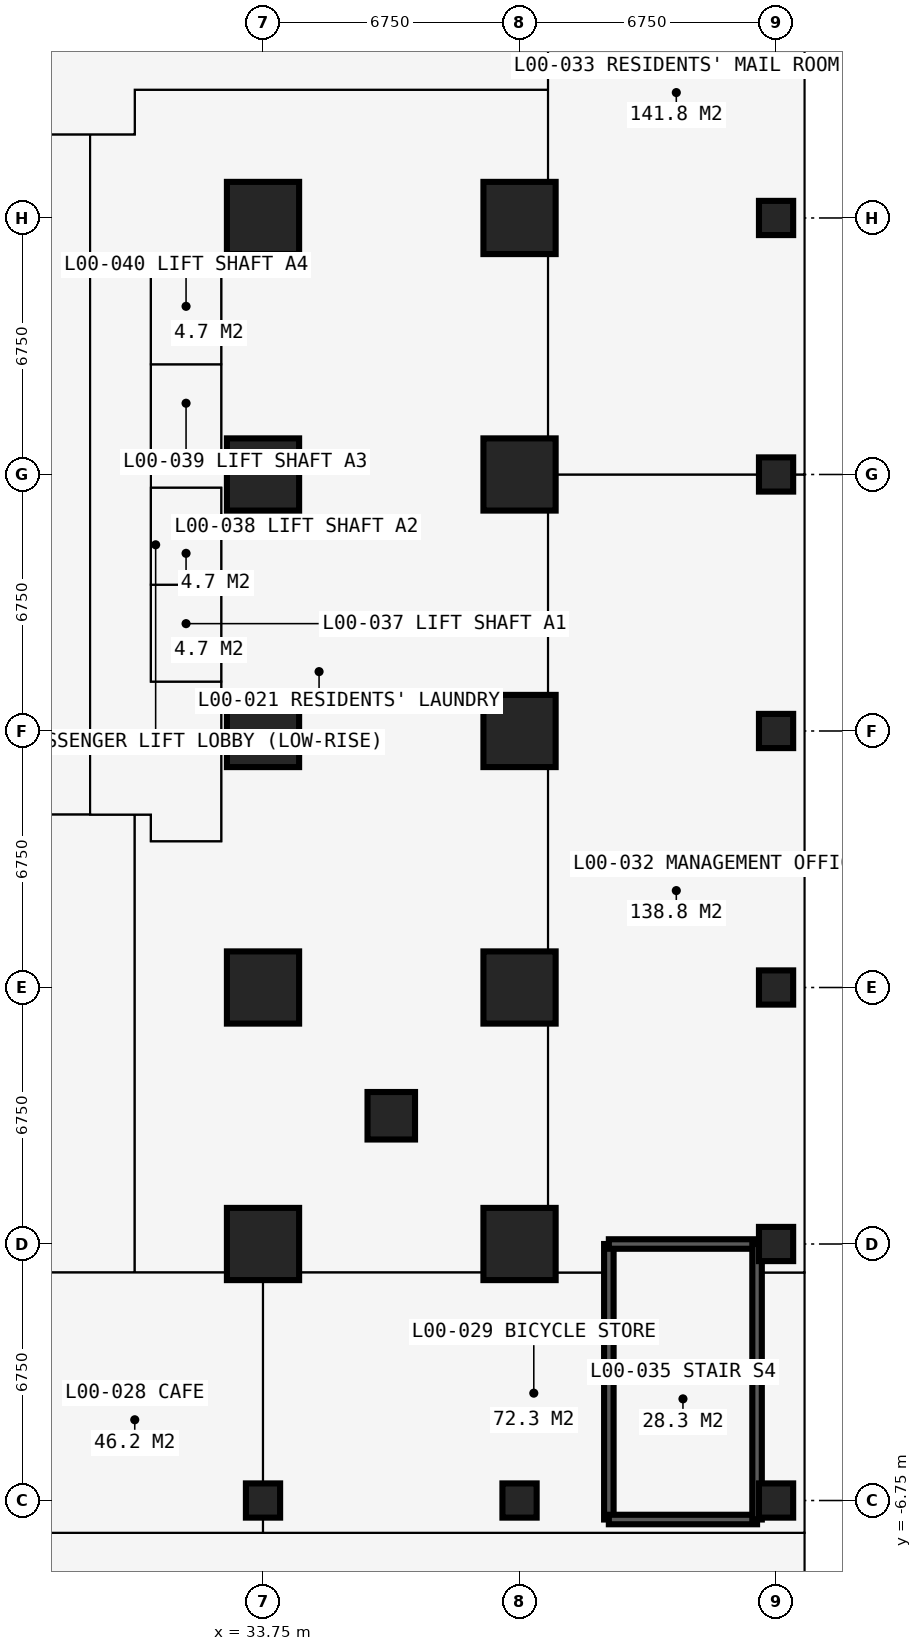
"""IFC4 building model, lengths in metres.
Left out: names, types, materials, properties, quantities, classifications, styles, units other than length and angle.
Written with IfcOpenShell. Run it as: python <this file> out.ifc"""

import sys

from ifc_helpers import new_model, si_unit, direction, frame, frame_2d, origin, origin_2d, place, context, subcontext, project, spatial, rectangle, circle, extrude, element, fill, save


model = new_model("IFC4")
c1 = context("Model", 3, precision=1e-05, world=origin(), true_north=direction((0.0, 1.0)))
c2 = subcontext(c1, "Body", "Model", "MODEL_VIEW")
j1 = project(units=[si_unit("LENGTHUNIT", "METRE"), si_unit("PLANEANGLEUNIT", "RADIAN")], contexts=[c1])
p1 = place(None, origin())
s1 = spatial("IfcSite", under=j1, at=p1, CompositionType="ELEMENT")
p2 = place(p1, origin())
s2 = spatial("IfcBuilding", under=s1, at=p2, CompositionType="ELEMENT")
p3 = place(p2, origin())
s3 = spatial("IfcBuildingStorey", under=s2, at=p3, CompositionType="ELEMENT", Elevation=0.0)
p4 = place(p3, frame((33.75, -6.75, 0.0), z_axis=(0.0, 0.0, 1.0), x_axis=(1.0, 0.0, 0.0)))
e1 = element("IfcColumn", 1, at=p4, inside=s3, PredefinedType="COLUMN", context=c2, shape_type="SweptSolid", body=[
    extrude(circle(Radius=0.45, at=origin_2d()), origin(), (0.0, 0.0, 1.0), 4.5),
])
for number, where, z_axis, x_axis in (
    (2, (33.75, 0.0, 0.0), (0.0, 0.0, 1.0), (1.0, 0.0, 0.0)),
    (3, (33.75, 6.75, 0.0), (0.0, 0.0, 1.0), (1.0, 0.0, 0.0)),
    (4, (33.75, 13.5, 0.0), (0.0, 0.0, 1.0), (1.0, 0.0, 0.0)),
    (5, (33.75, 20.25, 0.0), (0.0, 0.0, 1.0), (1.0, 0.0, 0.0)),
    (6, (33.75, 27.0, 0.0), (0.0, 0.0, 1.0), (1.0, 0.0, 0.0)),
):
    element("IfcColumn", number, at=place(p3, frame(where, z_axis=z_axis, x_axis=x_axis)), inside=s3, PredefinedType="COLUMN", context=c2, shape_type="SweptSolid", body=[
        extrude(rectangle(XDim=1.9, YDim=1.9, at=origin_2d()), origin(), (0.0, 0.0, 1.0), 4.5),
    ])
p5 = place(p3, frame((37.125, 3.375, 0.0), z_axis=(0.0, 0.0, 1.0), x_axis=(1.0, 0.0, 0.0)))
e7 = element("IfcColumn", 7, at=p5, inside=s3, PredefinedType="COLUMN", context=c2, shape_type="SweptSolid", body=[
    extrude(rectangle(XDim=1.25, YDim=1.25, at=origin_2d()), origin(), (0.0, 0.0, 1.0), 4.5),
])
p6 = place(p3, frame((40.5, -6.75, 0.0), z_axis=(0.0, 0.0, 1.0), x_axis=(1.0, 0.0, 0.0)))
e8 = element("IfcColumn", 8, at=p6, inside=s3, PredefinedType="COLUMN", context=c2, shape_type="SweptSolid", body=[
    extrude(circle(Radius=0.45, at=origin_2d()), origin(), (0.0, 0.0, 1.0), 4.5),
])
for number, where, z_axis, x_axis in (
    (9, (40.5, 0.0, 0.0), (0.0, 0.0, 1.0), (1.0, 0.0, 0.0)),
    (10, (40.5, 6.75, 0.0), (0.0, 0.0, 1.0), (1.0, 0.0, 0.0)),
    (11, (40.5, 13.5, 0.0), (0.0, 0.0, 1.0), (1.0, 0.0, 0.0)),
    (12, (40.5, 20.25, 0.0), (0.0, 0.0, 1.0), (1.0, 0.0, 0.0)),
    (13, (40.5, 27.0, 0.0), (0.0, 0.0, 1.0), (1.0, 0.0, 0.0)),
):
    element("IfcColumn", number, at=place(p3, frame(where, z_axis=z_axis, x_axis=x_axis)), inside=s3, PredefinedType="COLUMN", context=c2, shape_type="SweptSolid", body=[
        extrude(rectangle(XDim=1.9, YDim=1.9, at=origin_2d()), origin(), (0.0, 0.0, 1.0), 4.5),
    ])
for number, where, z_axis, x_axis in (
    (14, (47.25, -6.75, 0.0), (0.0, 0.0, 1.0), (1.0, 0.0, 0.0)),
    (15, (47.25, 0.0, 0.0), (0.0, 0.0, 1.0), (1.0, 0.0, 0.0)),
    (16, (47.25, 6.75, 0.0), (0.0, 0.0, 1.0), (1.0, 0.0, 0.0)),
    (17, (47.25, 13.5, 0.0), (0.0, 0.0, 1.0), (1.0, 0.0, 0.0)),
    (18, (47.25, 20.25, 0.0), (0.0, 0.0, 1.0), (1.0, 0.0, 0.0)),
    (19, (47.25, 27.0, 0.0), (0.0, 0.0, 1.0), (1.0, 0.0, 0.0)),
):
    element("IfcColumn", number, at=place(p3, frame(where, z_axis=z_axis, x_axis=x_axis)), inside=s3, PredefinedType="COLUMN", context=c2, shape_type="SweptSolid", body=[
        extrude(circle(Radius=0.45, at=origin_2d()), origin(), (0.0, 0.0, 1.0), 4.5),
    ])
p7 = place(p3, frame((48.0, -6.75, 0.0), z_axis=(0.0, 0.0, 1.0), x_axis=(0.0, -1.0, 0.0)))
e20 = element("IfcWall", 20, at=p7, inside=s3, PredefinedType="SOLIDWALL", context=c2, shape_type="SweptSolid", body=[
    extrude(rectangle(XDim=6.75, YDim=0.15, at=frame_2d((3.375, 0.0))), origin(), (0.0, 0.0, 1.0), 4.25),
])
p8 = place(p7, frame((2.625, 0.0, 0.0)))
e21 = element("IfcOpeningElement", 21, at=p8, cuts=e20, PredefinedType="OPENING", context=c2, shape_type="SweptSolid", body=[
    extrude(rectangle(XDim=1.5, YDim=2.4, at=frame_2d((0.75, 1.2))), frame((0.0, 0.085, 0.0), z_axis=(0.0, -1.0, 0.0), x_axis=(1.0, 0.0, 0.0)), (0.0, 0.0, 1.0), 0.17),
])
p9 = place(p3, frame((48.0, 0.0, 0.0), z_axis=(0.0, 0.0, 1.0), x_axis=(0.0, -1.0, 0.0)))
e22 = element("IfcWall", 22, at=p9, inside=s3, PredefinedType="SOLIDWALL", context=c2, shape_type="SweptSolid", body=[
    extrude(rectangle(XDim=6.75, YDim=0.15, at=frame_2d((3.375, 0.0))), origin(), (0.0, 0.0, 1.0), 4.25),
])
p10 = place(p9, frame((5.075, 0.0, 0.0)))
e23 = element("IfcOpeningElement", 23, at=p10, cuts=e22, PredefinedType="OPENING", context=c2, shape_type="SweptSolid", body=[
    extrude(rectangle(XDim=1.2, YDim=2.4, at=frame_2d((0.6, 1.2))), frame((0.0, 0.085, 0.0), z_axis=(0.0, -1.0, 0.0), x_axis=(1.0, 0.0, 0.0)), (0.0, 0.0, 1.0), 0.17),
])
p11 = place(p3, frame((8.9, 29.2, 0.0), z_axis=(0.0, 0.0, 1.0), x_axis=(1.0, 0.0, 0.0)))
e24 = element("IfcWall", 24, at=p11, inside=s3, PredefinedType="PARTITIONING", context=c2, shape_type="SweptSolid", body=[
    extrude(rectangle(XDim=21.475, YDim=0.15, at=frame_2d((10.738, 0.0))), origin(), (0.0, 0.0, 1.0), 4.25),
])
p12 = place(p11, frame((10.55, 0.0, 0.0)))
e25 = element("IfcOpeningElement", 25, at=p12, cuts=e24, PredefinedType="OPENING", context=c2, shape_type="SweptSolid", body=[
    extrude(rectangle(XDim=1.6, YDim=2.4, at=frame_2d((0.8, 1.2))), frame((0.0, 0.085, 0.0), z_axis=(0.0, -1.0, 0.0), x_axis=(1.0, 0.0, 0.0)), (0.0, 0.0, 1.0), 0.17),
])
p13 = place(p3, frame((10.125, 11.3, 0.0), z_axis=(0.0, 0.0, 1.0), x_axis=(1.0, 0.0, 0.0)))
e26 = element("IfcWall", 26, at=p13, inside=s3, PredefinedType="PARTITIONING", context=c2, shape_type="SweptSolid", body=[
    extrude(rectangle(XDim=20.675, YDim=0.15, at=frame_2d((10.337, 0.0))), origin(), (0.0, 0.0, 1.0), 4.25),
])
p14 = place(p13, frame((9.325, 0.0, 0.0)))
e27 = element("IfcOpeningElement", 27, at=p14, cuts=e26, PredefinedType="OPENING", context=c2, shape_type="SweptSolid", body=[
    extrude(rectangle(XDim=1.6, YDim=2.4, at=frame_2d((0.8, 1.2))), frame((0.0, 0.085, 0.0), z_axis=(0.0, -1.0, 0.0), x_axis=(1.0, 0.0, 0.0)), (0.0, 0.0, 1.0), 0.17),
])
p15 = place(p3, frame((27.0, -7.6, 0.0), z_axis=(0.0, 0.0, 1.0), x_axis=(1.0, 0.0, 0.0)))
e28 = element("IfcWall", 28, at=p15, inside=s3, PredefinedType="PARTITIONING", context=c2, shape_type="SweptSolid", body=[
    extrude(rectangle(XDim=20.984, YDim=0.15, at=frame_2d((10.492, 0.0))), origin(), (0.0, 0.0, 1.0), 4.25),
])
p16 = place(p15, frame((14.0, 0.0, 0.0)))
e29 = element("IfcOpeningElement", 29, at=p16, cuts=e28, PredefinedType="OPENING", context=c2, shape_type="SweptSolid", body=[
    extrude(rectangle(XDim=0.95, YDim=2.2, at=frame_2d((0.475, 1.1))), frame((0.0, 0.085, 0.0), z_axis=(0.0, -1.0, 0.0), x_axis=(1.0, 0.0, 0.0)), (0.0, 0.0, 1.0), 0.17),
])
p17 = place(p3, frame((27.0, -0.75, 0.0), z_axis=(0.0, 0.0, 1.0), x_axis=(1.0, 0.0, 0.0)))
e30 = element("IfcWall", 30, at=p17, inside=s3, PredefinedType="PARTITIONING", context=c2, shape_type="SweptSolid", body=[
    extrude(rectangle(XDim=15.85, YDim=0.15, at=frame_2d((7.925, 0.0))), origin(), (0.0, 0.0, 1.0), 4.25),
])
p18 = place(p3, frame((29.2, 11.3, 0.0), z_axis=(0.0, 0.0, 1.0), x_axis=(0.0, 1.0, 0.0)))
e31 = element("IfcWall", 31, at=p18, inside=s3, PredefinedType="PARTITIONING", context=c2, shape_type="SweptSolid", body=[
    extrude(rectangle(XDim=17.9, YDim=0.2, at=frame_2d((8.95, 0.0))), origin(), (0.0, 0.0, 1.0), 4.25),
])
p19 = place(p18, frame((15.35, 0.0, 0.0)))
e32 = element("IfcOpeningElement", 32, at=p19, cuts=e31, PredefinedType="OPENING", context=c2, shape_type="SweptSolid", body=[
    extrude(rectangle(XDim=1.6, YDim=2.4, at=frame_2d((0.8, 1.2))), frame((0.0, 0.11, 0.0), z_axis=(0.0, -1.0, 0.0), x_axis=(1.0, 0.0, 0.0)), (0.0, 0.0, 1.0), 0.22),
])
p20 = place(p18, frame((8.35, 0.0, 0.0)))
e33 = element("IfcOpeningElement", 33, at=p20, cuts=e31, PredefinedType="OPENING", context=c2, shape_type="SweptSolid", body=[
    extrude(rectangle(XDim=1.2, YDim=2.2, at=frame_2d((0.6, 1.1))), frame((0.0, 0.11, 0.0), z_axis=(0.0, -1.0, 0.0), x_axis=(1.0, 0.0, 0.0)), (0.0, 0.0, 1.0), 0.22),
])
p21 = place(p3, frame((29.2, 25.7, 0.0), z_axis=(0.0, 0.0, 1.0), x_axis=(1.0, 0.0, 0.0)))
e34 = element("IfcWall", 34, at=p21, inside=s3, PredefinedType="SHEAR", context=c2, shape_type="SweptSolid", body=[
    extrude(rectangle(XDim=3.45, YDim=0.1, at=frame_2d((1.725, 0.0))), origin(), (0.0, 0.0, 1.0), 4.25),
])
p22 = place(p3, frame((30.375, -0.75, 0.0), z_axis=(0.0, 0.0, 1.0), x_axis=(0.0, 1.0, 0.0)))
e35 = element("IfcWall", 35, at=p22, inside=s3, PredefinedType="PARTITIONING", context=c2, shape_type="SweptSolid", body=[
    extrude(rectangle(XDim=12.05, YDim=0.15, at=frame_2d((6.025, 0.0))), origin(), (0.0, 0.0, 1.0), 4.25),
])
p23 = place(p3, frame((30.375, 29.2, 0.0), z_axis=(0.0, 0.0, 1.0), x_axis=(0.0, 1.0, 0.0)))
e36 = element("IfcWall", 36, at=p23, inside=s3, PredefinedType="PARTITIONING", context=c2, shape_type="SweptSolid", body=[
    extrude(rectangle(XDim=1.175, YDim=0.15, at=frame_2d((0.587, 0.0))), origin(), (0.0, 0.0, 1.0), 4.25),
])
p24 = place(p3, frame((30.375, 30.375, 0.0), z_axis=(0.0, 0.0, 1.0), x_axis=(1.0, 0.0, 0.0)))
e37 = element("IfcWall", 37, at=p24, inside=s3, PredefinedType="PARTITIONING", context=c2, shape_type="SweptSolid", body=[
    extrude(rectangle(XDim=10.875, YDim=0.15, at=frame_2d((5.438, 0.0))), origin(), (0.0, 0.0, 1.0), 4.25),
])
p25 = place(p3, frame((30.8, 10.6, 0.0), z_axis=(0.0, 0.0, 1.0), x_axis=(0.0, 1.0, 0.0)))
e38 = element("IfcWall", 38, at=p25, inside=s3, PredefinedType="PARTITIONING", context=c2, shape_type="SweptSolid", body=[
    extrude(rectangle(XDim=0.7, YDim=0.15, at=frame_2d((0.35, 0.0))), origin(), (0.0, 0.0, 1.0), 4.25),
])
p26 = place(p3, frame((30.8, 10.6, 0.0), z_axis=(0.0, 0.0, 1.0), x_axis=(1.0, 0.0, 0.0)))
e39 = element("IfcWall", 39, at=p26, inside=s3, PredefinedType="PARTITIONING", context=c2, shape_type="SweptSolid", body=[
    extrude(rectangle(XDim=1.85, YDim=0.15, at=frame_2d((0.925, 0.0))), origin(), (0.0, 0.0, 1.0), 4.25),
])
p27 = place(p3, frame((30.8, 14.8, 0.0), z_axis=(0.0, 0.0, 1.0), x_axis=(0.0, 1.0, 0.0)))
e40 = element("IfcWall", 40, at=p27, inside=s3, PredefinedType="PARTITIONING", context=c2, shape_type="SweptSolid", body=[
    extrude(rectangle(XDim=10.9, YDim=0.15, at=frame_2d((5.45, 0.0))), origin(), (0.0, 0.0, 1.0), 4.25),
])
p28 = place(p27, frame((0.75, 0.0, 0.0)))
e41 = element("IfcOpeningElement", 41, at=p28, cuts=e40, PredefinedType="OPENING", context=c2, shape_type="SweptSolid", body=[
    extrude(rectangle(XDim=1.1, YDim=2.2, at=frame_2d((0.55, 1.1))), frame((0.0, 0.085, 0.0), z_axis=(0.0, -1.0, 0.0), x_axis=(1.0, 0.0, 0.0)), (0.0, 0.0, 1.0), 0.17),
])
p29 = place(p27, frame((3.25, 0.0, 0.0)))
e42 = element("IfcOpeningElement", 42, at=p29, cuts=e40, PredefinedType="OPENING", context=c2, shape_type="SweptSolid", body=[
    extrude(rectangle(XDim=1.1, YDim=2.2, at=frame_2d((0.55, 1.1))), frame((0.0, 0.085, 0.0), z_axis=(0.0, -1.0, 0.0), x_axis=(1.0, 0.0, 0.0)), (0.0, 0.0, 1.0), 0.17),
])
p30 = place(p27, frame((6.5, 0.0, 0.0)))
e43 = element("IfcOpeningElement", 43, at=p30, cuts=e40, PredefinedType="OPENING", context=c2, shape_type="SweptSolid", body=[
    extrude(rectangle(XDim=1.1, YDim=2.2, at=frame_2d((0.55, 1.1))), frame((0.0, 0.085, 0.0), z_axis=(0.0, -1.0, 0.0), x_axis=(1.0, 0.0, 0.0)), (0.0, 0.0, 1.0), 0.17),
])
p31 = place(p27, frame((9.05, 0.0, 0.0)))
e44 = element("IfcOpeningElement", 44, at=p31, cuts=e40, PredefinedType="OPENING", context=c2, shape_type="SweptSolid", body=[
    extrude(rectangle(XDim=1.1, YDim=2.2, at=frame_2d((0.55, 1.1))), frame((0.0, 0.085, 0.0), z_axis=(0.0, -1.0, 0.0), x_axis=(1.0, 0.0, 0.0)), (0.0, 0.0, 1.0), 0.17),
])
for number, where, z_axis, x_axis in (
    (45, (30.8, 14.8, 0.0), (0.0, 0.0, 1.0), (1.0, 0.0, 0.0)),
    (46, (30.8, 17.35, 0.0), (0.0, 0.0, 1.0), (1.0, 0.0, 0.0)),
    (47, (30.8, 19.9, 0.0), (0.0, 0.0, 1.0), (1.0, 0.0, 0.0)),
    (48, (30.8, 20.6, 0.0), (0.0, 0.0, 1.0), (1.0, 0.0, 0.0)),
    (49, (30.8, 23.15, 0.0), (0.0, 0.0, 1.0), (1.0, 0.0, 0.0)),
):
    element("IfcWall", number, at=place(p3, frame(where, z_axis=z_axis, x_axis=x_axis)), inside=s3, PredefinedType="SHEAR", context=c2, shape_type="SweptSolid", body=[
        extrude(rectangle(XDim=1.85, YDim=0.1, at=frame_2d((0.925, 0.0))), origin(), (0.0, 0.0, 1.0), 4.25),
    ])
p32 = place(p3, frame((32.65, 10.6, 0.0), z_axis=(0.0, 0.0, 1.0), x_axis=(0.0, 1.0, 0.0)))
e50 = element("IfcWall", 50, at=p32, inside=s3, PredefinedType="SHEAR", context=c2, shape_type="SweptSolid", body=[
    extrude(rectangle(XDim=9.3, YDim=0.1, at=frame_2d((4.65, 0.0))), origin(), (0.0, 0.0, 1.0), 4.25),
])
p33 = place(p3, frame((32.65, 20.6, 0.0), z_axis=(0.0, 0.0, 1.0), x_axis=(0.0, 1.0, 0.0)))
e51 = element("IfcWall", 51, at=p33, inside=s3, PredefinedType="PARTITIONING", context=c2, shape_type="SweptSolid", body=[
    extrude(rectangle(XDim=5.1, YDim=0.15, at=frame_2d((2.55, 0.0))), origin(), (0.0, 0.0, 1.0), 4.25),
])
p34 = place(p3, frame((33.75, -7.6, 0.0), z_axis=(0.0, 0.0, 1.0), x_axis=(0.0, 1.0, 0.0)))
e52 = element("IfcWall", 52, at=p34, inside=s3, PredefinedType="PARTITIONING", context=c2, shape_type="SweptSolid", body=[
    extrude(rectangle(XDim=6.85, YDim=0.15, at=frame_2d((3.425, 0.0))), origin(), (0.0, 0.0, 1.0), 3.752),
])
p35 = place(p3, frame((41.25, -0.75, 0.0), z_axis=(0.0, 0.0, 1.0), x_axis=(0.0, 1.0, 0.0)))
e53 = element("IfcWall", 53, at=p35, inside=s3, PredefinedType="PARTITIONING", context=c2, shape_type="SweptSolid", body=[
    extrude(rectangle(XDim=41.984, YDim=0.15, at=frame_2d((20.992, 0.0))), origin(), (0.0, 0.0, 1.0), 4.25),
])
p36 = place(p35, frame((9.7, 0.0, 0.0)))
e54 = element("IfcOpeningElement", 54, at=p36, cuts=e53, PredefinedType="OPENING", context=c2, shape_type="SweptSolid", body=[
    extrude(rectangle(XDim=1.6, YDim=2.4, at=frame_2d((0.8, 1.2))), frame((0.0, 0.085, 0.0), z_axis=(0.0, -1.0, 0.0), x_axis=(1.0, 0.0, 0.0)), (0.0, 0.0, 1.0), 0.17),
])
p37 = place(p35, frame((25.15, 0.0, 0.0)))
e55 = element("IfcOpeningElement", 55, at=p37, cuts=e53, PredefinedType="OPENING", context=c2, shape_type="SweptSolid", body=[
    extrude(rectangle(XDim=1.6, YDim=2.4, at=frame_2d((0.8, 1.2))), frame((0.0, 0.085, 0.0), z_axis=(0.0, -1.0, 0.0), x_axis=(1.0, 0.0, 0.0)), (0.0, 0.0, 1.0), 0.17),
])
p38 = place(p3, frame((41.25, 20.25, 0.0), z_axis=(0.0, 0.0, 1.0), x_axis=(1.0, 0.0, 0.0)))
e56 = element("IfcWall", 56, at=p38, inside=s3, PredefinedType="PARTITIONING", context=c2, shape_type="SweptSolid", body=[
    extrude(rectangle(XDim=6.734, YDim=0.15, at=frame_2d((3.367, 0.0))), origin(), (0.0, 0.0, 1.0), 3.752),
])
p39 = place(p3, frame((42.85, -7.25, 0.0), z_axis=(0.0, 0.0, 1.0), x_axis=(0.0, 1.0, 0.0)))
e57 = element("IfcWall", 57, at=p39, inside=s3, PredefinedType="SOLIDWALL", context=c2, shape_type="SweptSolid", body=[
    extrude(rectangle(XDim=7.25, YDim=0.25, at=frame_2d((3.625, 0.0))), origin(), (0.0, 0.0, 1.0), 4.25),
])
for number, where, z_axis, x_axis in (
    (58, (42.85, -7.25, 0.0), (0.0, 0.0, 1.0), (1.0, 0.0, 0.0)),
    (59, (42.85, 0.0, 0.0), (0.0, 0.0, 1.0), (1.0, 0.0, 0.0)),
):
    element("IfcWall", number, at=place(p3, frame(where, z_axis=z_axis, x_axis=x_axis)), inside=s3, PredefinedType="SOLIDWALL", context=c2, shape_type="SweptSolid", body=[
        extrude(rectangle(XDim=3.9, YDim=0.25, at=frame_2d((1.95, 0.0))), origin(), (0.0, 0.0, 1.0), 4.25),
    ])
p40 = place(p3, frame((46.75, -7.25, 0.0), z_axis=(0.0, 0.0, 1.0), x_axis=(0.0, 1.0, 0.0)))
e60 = element("IfcWall", 60, at=p40, inside=s3, PredefinedType="SOLIDWALL", context=c2, shape_type="SweptSolid", body=[
    extrude(rectangle(XDim=7.25, YDim=0.25, at=frame_2d((3.625, 0.0))), origin(), (0.0, 0.0, 1.0), 4.25),
])
p41 = place(p3, frame((46.75, -0.75, 0.0), z_axis=(0.0, 0.0, 1.0), x_axis=(1.0, 0.0, 0.0)))
e61 = element("IfcWall", 61, at=p41, inside=s3, PredefinedType="PARTITIONING", context=c2, shape_type="SweptSolid", body=[
    extrude(rectangle(XDim=1.234, YDim=0.15, at=frame_2d((0.617, 0.0))), origin(), (0.0, 0.0, 1.0), 4.25),
])
p42 = place(p10, origin())
e62 = element("IfcDoor", 62, at=p42, inside=s3, OperationType="SINGLE_SWING_LEFT", PredefinedType="DOOR", context=c2, shape_type="SweptSolid", body=[
    extrude(rectangle(XDim=1.2, YDim=2.4, at=frame_2d((0.6, 1.2))), frame((0.0, 0.025, 0.0), z_axis=(0.0, -1.0, 0.0), x_axis=(1.0, 0.0, 0.0)), (0.0, 0.0, 1.0), 0.05),
])
fill(e23, e62)
p43 = place(p19, origin())
e63 = element("IfcDoor", 63, at=p43, inside=s3, OperationType="DOUBLE_DOOR_SINGLE_SWING", PredefinedType="DOOR", context=c2, shape_type="SweptSolid", body=[
    extrude(rectangle(XDim=1.6, YDim=2.4, at=frame_2d((0.8, 1.2))), frame((0.0, 0.025, 0.0), z_axis=(0.0, -1.0, 0.0), x_axis=(1.0, 0.0, 0.0)), (0.0, 0.0, 1.0), 0.05),
])
fill(e32, e63)
p44 = place(p16, origin())
e64 = element("IfcDoor", 64, at=p44, inside=s3, OperationType="SINGLE_SWING_LEFT", PredefinedType="DOOR", context=c2, shape_type="SweptSolid", body=[
    extrude(rectangle(XDim=0.95, YDim=2.2, at=frame_2d((0.475, 1.1))), frame((0.0, 0.025, 0.0), z_axis=(0.0, -1.0, 0.0), x_axis=(1.0, 0.0, 0.0)), (0.0, 0.0, 1.0), 0.05),
])
fill(e29, e64)
p45 = place(p36, origin())
e65 = element("IfcDoor", 65, at=p45, inside=s3, OperationType="DOUBLE_DOOR_SINGLE_SWING", PredefinedType="DOOR", context=c2, shape_type="SweptSolid", body=[
    extrude(rectangle(XDim=1.6, YDim=2.4, at=frame_2d((0.8, 1.2))), frame((0.0, 0.025, 0.0), z_axis=(0.0, -1.0, 0.0), x_axis=(1.0, 0.0, 0.0)), (0.0, 0.0, 1.0), 0.05),
])
fill(e54, e65)
p46 = place(p37, origin())
e66 = element("IfcDoor", 66, at=p46, inside=s3, OperationType="DOUBLE_DOOR_SINGLE_SWING", PredefinedType="DOOR", context=c2, shape_type="SweptSolid", body=[
    extrude(rectangle(XDim=1.6, YDim=2.4, at=frame_2d((0.8, 1.2))), frame((0.0, 0.025, 0.0), z_axis=(0.0, -1.0, 0.0), x_axis=(1.0, 0.0, 0.0)), (0.0, 0.0, 1.0), 0.05),
])
fill(e55, e66)
p47 = place(p28, origin())
e67 = element("IfcDoor", 67, at=p47, inside=s3, OperationType="DOUBLE_DOOR_SLIDING", PredefinedType="DOOR", context=c2, shape_type="SweptSolid", body=[
    extrude(rectangle(XDim=1.1, YDim=2.2, at=frame_2d((0.55, 1.1))), frame((0.0, 0.025, 0.0), z_axis=(0.0, -1.0, 0.0), x_axis=(1.0, 0.0, 0.0)), (0.0, 0.0, 1.0), 0.05),
])
fill(e41, e67)
p48 = place(p29, origin())
e68 = element("IfcDoor", 68, at=p48, inside=s3, OperationType="DOUBLE_DOOR_SLIDING", PredefinedType="DOOR", context=c2, shape_type="SweptSolid", body=[
    extrude(rectangle(XDim=1.1, YDim=2.2, at=frame_2d((0.55, 1.1))), frame((0.0, 0.025, 0.0), z_axis=(0.0, -1.0, 0.0), x_axis=(1.0, 0.0, 0.0)), (0.0, 0.0, 1.0), 0.05),
])
fill(e42, e68)
p49 = place(p30, origin())
e69 = element("IfcDoor", 69, at=p49, inside=s3, OperationType="DOUBLE_DOOR_SLIDING", PredefinedType="DOOR", context=c2, shape_type="SweptSolid", body=[
    extrude(rectangle(XDim=1.1, YDim=2.2, at=frame_2d((0.55, 1.1))), frame((0.0, 0.025, 0.0), z_axis=(0.0, -1.0, 0.0), x_axis=(1.0, 0.0, 0.0)), (0.0, 0.0, 1.0), 0.05),
])
fill(e43, e69)
p50 = place(p31, origin())
e70 = element("IfcDoor", 70, at=p50, inside=s3, OperationType="DOUBLE_DOOR_SLIDING", PredefinedType="DOOR", context=c2, shape_type="SweptSolid", body=[
    extrude(rectangle(XDim=1.1, YDim=2.2, at=frame_2d((0.55, 1.1))), frame((0.0, 0.025, 0.0), z_axis=(0.0, -1.0, 0.0), x_axis=(1.0, 0.0, 0.0)), (0.0, 0.0, 1.0), 0.05),
])
fill(e44, e70)
p51 = place(p20, origin())
e71 = element("IfcDoor", 71, at=p51, inside=s3, OperationType="DOUBLE_DOOR_SINGLE_SWING", PredefinedType="DOOR", context=c2, shape_type="SweptSolid", body=[
    extrude(rectangle(XDim=1.2, YDim=2.2, at=frame_2d((0.6, 1.1))), frame((0.0, 0.025, 0.0), z_axis=(0.0, -1.0, 0.0), x_axis=(1.0, 0.0, 0.0)), (0.0, 0.0, 1.0), 0.05),
])
fill(e33, e71)
save(model, sys.argv[1])
